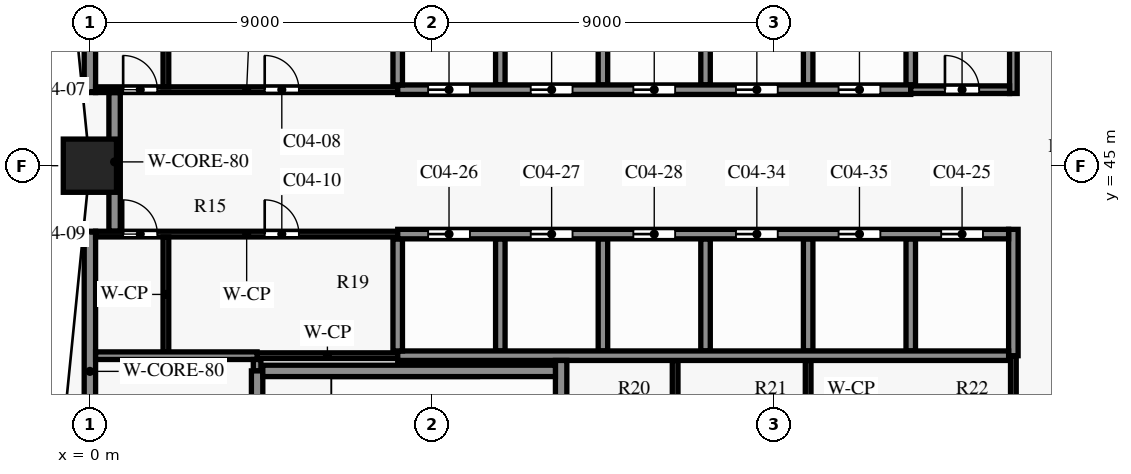
"""IFC4 building model, lengths in metres.
Left out: names, types, materials, properties, quantities, classifications, styles, units other than length and angle.
Written with IfcOpenShell. Run it as: python <this file> out.ifc"""

import sys

from ifc_helpers import new_model, si_unit, direction, frame, frame_2d, origin, origin_2d, place, context, subcontext, project, spatial, rectangle, extrude, element, fill, save


model = new_model("IFC4")
c1 = context("Model", 3, precision=1e-05, world=origin(), true_north=direction((0.0, 1.0)))
c2 = subcontext(c1, "Body", "Model", "MODEL_VIEW")
j1 = project(units=[si_unit("LENGTHUNIT", "METRE"), si_unit("PLANEANGLEUNIT", "RADIAN")], contexts=[c1])
p1 = place(None, origin())
s1 = spatial("IfcSite", under=j1, at=p1, CompositionType="ELEMENT")
p2 = place(p1, origin())
s2 = spatial("IfcBuilding", under=s1, at=p2, CompositionType="ELEMENT")
p3 = place(p2, frame((0.0, 0.0, 14.5)))
s3 = spatial("IfcBuildingStorey", under=s2, at=p3, CompositionType="ELEMENT", Elevation=14.5)
p4 = place(p3, frame((0.0, 45.0, 0.0), z_axis=(0.0, 0.0, 1.0), x_axis=(1.0, 0.0, 0.0)))
e1 = element("IfcColumn", 1, at=p4, inside=s3, PredefinedType="COLUMN", context=c2, shape_type="SweptSolid", body=[
    extrude(rectangle(XDim=1.4, YDim=1.4, at=origin_2d()), origin(), (0.0, 0.0, 1.0), 5.0),
])
p5 = place(p3, frame((4.55, 39.6, 0.0), z_axis=(0.0, 0.0, 1.0), x_axis=(1.0, 0.0, 0.0)))
e2 = element("IfcWall", 2, at=p5, inside=s3, PredefinedType="SHEAR", context=c2, shape_type="SweptSolid", body=[
    extrude(rectangle(XDim=7.7, YDim=0.3, at=frame_2d((3.85, 0.0))), origin(), (0.0, 0.0, 1.0), 4.7),
])
p6 = place(p3, frame((4.4, 40.0, 0.0), z_axis=(0.0, 0.0, 1.0), x_axis=(1.0, 0.0, 0.0)))
e3 = element("IfcWall", 3, at=p6, inside=s3, PredefinedType="PARTITIONING", context=c2, shape_type="SweptSolid", body=[
    extrude(rectangle(XDim=3.7, YDim=0.15, at=frame_2d((1.85, 0.0))), origin(), (0.0, 0.0, 1.0), 4.7),
])
p7 = place(p3, frame((0.15, 40.0, 0.0), z_axis=(0.0, 0.0, 1.0), x_axis=(1.0, 0.0, 0.0)))
e4 = element("IfcWall", 4, at=p7, inside=s3, PredefinedType="PARTITIONING", context=c2, shape_type="SweptSolid", body=[
    extrude(rectangle(XDim=4.25, YDim=0.2, at=frame_2d((2.125, 0.0))), origin(), (0.0, 0.0, 1.0), 4.7),
])
p8 = place(p3, frame((8.1, 40.0, 0.0), z_axis=(0.0, 0.0, 1.0), x_axis=(1.0, 0.0, 0.0)))
e5 = element("IfcWall", 5, at=p8, inside=s3, PredefinedType="SHEAR", context=c2, shape_type="SweptSolid", body=[
    extrude(rectangle(XDim=16.075, YDim=0.25, at=frame_2d((8.038, 0.0))), origin(), (0.0, 0.0, 1.0), 4.7),
])
p9 = place(p3, frame((0.15, 43.2, 0.0), z_axis=(0.0, 0.0, 1.0), x_axis=(1.0, 0.0, 0.0)))
e6 = element("IfcWall", 6, at=p9, inside=s3, PredefinedType="PARTITIONING", context=c2, shape_type="SweptSolid", body=[
    extrude(rectangle(XDim=7.95, YDim=0.15, at=frame_2d((3.975, 0.0))), origin(), (0.0, 0.0, 1.0), 4.7),
])
p10 = place(p9, frame((0.725, 0.0, 0.0)))
e7 = element("IfcOpeningElement", 7, at=p10, cuts=e6, PredefinedType="OPENING", context=c2, shape_type="SweptSolid", body=[
    extrude(rectangle(XDim=0.9, YDim=2.1, at=frame_2d((0.45, 1.05))), frame((0.0, 0.085, 0.0), z_axis=(0.0, -1.0, 0.0), x_axis=(1.0, 0.0, 0.0)), (0.0, 0.0, 1.0), 0.17),
])
p11 = place(p9, frame((4.45, 0.0, 0.0)))
e8 = element("IfcOpeningElement", 8, at=p11, cuts=e6, PredefinedType="OPENING", context=c2, shape_type="SweptSolid", body=[
    extrude(rectangle(XDim=0.9, YDim=2.1, at=frame_2d((0.45, 1.05))), frame((0.0, 0.085, 0.0), z_axis=(0.0, -1.0, 0.0), x_axis=(1.0, 0.0, 0.0)), (0.0, 0.0, 1.0), 0.17),
])
p12 = place(p3, frame((8.1, 43.2, 0.0), z_axis=(0.0, 0.0, 1.0), x_axis=(1.0, 0.0, 0.0)))
e9 = element("IfcWall", 9, at=p12, inside=s3, PredefinedType="SHEAR", context=c2, shape_type="SweptSolid", body=[
    extrude(rectangle(XDim=16.075, YDim=0.25, at=frame_2d((8.038, 0.0))), origin(), (0.0, 0.0, 1.0), 4.7),
])
p13 = place(p12, frame((14.3, 0.0, 0.0)))
e10 = element("IfcOpeningElement", 10, at=p13, cuts=e9, PredefinedType="OPENING", context=c2, shape_type="SweptSolid", body=[
    extrude(rectangle(XDim=1.1, YDim=2.1, at=frame_2d((0.55, 1.05))), frame((0.0, 0.135, 0.0), z_axis=(0.0, -1.0, 0.0), x_axis=(1.0, 0.0, 0.0)), (0.0, 0.0, 1.0), 0.27),
])
p14 = place(p12, frame((0.8, 0.0, 0.0)))
e11 = element("IfcOpeningElement", 11, at=p14, cuts=e9, PredefinedType="OPENING", context=c2, shape_type="SweptSolid", body=[
    extrude(rectangle(XDim=1.1, YDim=2.1, at=frame_2d((0.55, 1.05))), frame((0.0, 0.135, 0.0), z_axis=(0.0, -1.0, 0.0), x_axis=(1.0, 0.0, 0.0)), (0.0, 0.0, 1.0), 0.27),
])
p15 = place(p12, frame((3.5, 0.0, 0.0)))
e12 = element("IfcOpeningElement", 12, at=p15, cuts=e9, PredefinedType="OPENING", context=c2, shape_type="SweptSolid", body=[
    extrude(rectangle(XDim=1.1, YDim=2.1, at=frame_2d((0.55, 1.05))), frame((0.0, 0.135, 0.0), z_axis=(0.0, -1.0, 0.0), x_axis=(1.0, 0.0, 0.0)), (0.0, 0.0, 1.0), 0.27),
])
p16 = place(p12, frame((6.2, 0.0, 0.0)))
e13 = element("IfcOpeningElement", 13, at=p16, cuts=e9, PredefinedType="OPENING", context=c2, shape_type="SweptSolid", body=[
    extrude(rectangle(XDim=1.1, YDim=2.1, at=frame_2d((0.55, 1.05))), frame((0.0, 0.135, 0.0), z_axis=(0.0, -1.0, 0.0), x_axis=(1.0, 0.0, 0.0)), (0.0, 0.0, 1.0), 0.27),
])
p17 = place(p12, frame((8.9, 0.0, 0.0)))
e14 = element("IfcOpeningElement", 14, at=p17, cuts=e9, PredefinedType="OPENING", context=c2, shape_type="SweptSolid", body=[
    extrude(rectangle(XDim=1.1, YDim=2.1, at=frame_2d((0.55, 1.05))), frame((0.0, 0.135, 0.0), z_axis=(0.0, -1.0, 0.0), x_axis=(1.0, 0.0, 0.0)), (0.0, 0.0, 1.0), 0.27),
])
p18 = place(p12, frame((11.6, 0.0, 0.0)))
e15 = element("IfcOpeningElement", 15, at=p18, cuts=e9, PredefinedType="OPENING", context=c2, shape_type="SweptSolid", body=[
    extrude(rectangle(XDim=1.1, YDim=2.1, at=frame_2d((0.55, 1.05))), frame((0.0, 0.135, 0.0), z_axis=(0.0, -1.0, 0.0), x_axis=(1.0, 0.0, 0.0)), (0.0, 0.0, 1.0), 0.27),
])
p19 = place(p3, frame((0.15, 47.0, 0.0), z_axis=(0.0, 0.0, 1.0), x_axis=(1.0, 0.0, 0.0)))
e16 = element("IfcWall", 16, at=p19, inside=s3, PredefinedType="PARTITIONING", context=c2, shape_type="SweptSolid", body=[
    extrude(rectangle(XDim=7.95, YDim=0.15, at=frame_2d((3.975, 0.0))), origin(), (0.0, 0.0, 1.0), 4.7),
])
p20 = place(p19, frame((0.725, 0.0, 0.0)))
e17 = element("IfcOpeningElement", 17, at=p20, cuts=e16, PredefinedType="OPENING", context=c2, shape_type="SweptSolid", body=[
    extrude(rectangle(XDim=0.9, YDim=2.1, at=frame_2d((0.45, 1.05))), frame((0.0, 0.085, 0.0), z_axis=(0.0, -1.0, 0.0), x_axis=(1.0, 0.0, 0.0)), (0.0, 0.0, 1.0), 0.17),
])
p21 = place(p19, frame((4.45, 0.0, 0.0)))
e18 = element("IfcOpeningElement", 18, at=p21, cuts=e16, PredefinedType="OPENING", context=c2, shape_type="SweptSolid", body=[
    extrude(rectangle(XDim=0.9, YDim=2.1, at=frame_2d((0.45, 1.05))), frame((0.0, 0.085, 0.0), z_axis=(0.0, -1.0, 0.0), x_axis=(1.0, 0.0, 0.0)), (0.0, 0.0, 1.0), 0.17),
])
p22 = place(p3, frame((21.6, 47.0, 0.0), z_axis=(0.0, 0.0, 1.0), x_axis=(1.0, 0.0, 0.0)))
e19 = element("IfcWall", 19, at=p22, inside=s3, PredefinedType="PARTITIONING", context=c2, shape_type="SweptSolid", body=[
    extrude(rectangle(XDim=2.6, YDim=0.2, at=frame_2d((1.3, 0.0))), origin(), (0.0, 0.0, 1.0), 4.7),
])
p23 = place(p22, frame((0.9, 0.0, 0.0)))
e20 = element("IfcOpeningElement", 20, at=p23, cuts=e19, PredefinedType="OPENING", context=c2, shape_type="SweptSolid", body=[
    extrude(rectangle(XDim=0.9, YDim=2.1, at=frame_2d((0.45, 1.05))), frame((0.0, 0.11, 0.0), z_axis=(0.0, -1.0, 0.0), x_axis=(1.0, 0.0, 0.0)), (0.0, 0.0, 1.0), 0.22),
])
p24 = place(p3, frame((8.1, 47.0, 0.0), z_axis=(0.0, 0.0, 1.0), x_axis=(1.0, 0.0, 0.0)))
e21 = element("IfcWall", 21, at=p24, inside=s3, PredefinedType="SHEAR", context=c2, shape_type="SweptSolid", body=[
    extrude(rectangle(XDim=13.5, YDim=0.25, at=frame_2d((6.75, 0.0))), origin(), (0.0, 0.0, 1.0), 4.7),
])
p25 = place(p24, frame((0.8, 0.0, 0.0)))
e22 = element("IfcOpeningElement", 22, at=p25, cuts=e21, PredefinedType="OPENING", context=c2, shape_type="SweptSolid", body=[
    extrude(rectangle(XDim=1.1, YDim=2.1, at=frame_2d((0.55, 1.05))), frame((0.0, 0.135, 0.0), z_axis=(0.0, -1.0, 0.0), x_axis=(1.0, 0.0, 0.0)), (0.0, 0.0, 1.0), 0.27),
])
p26 = place(p24, frame((3.5, 0.0, 0.0)))
e23 = element("IfcOpeningElement", 23, at=p26, cuts=e21, PredefinedType="OPENING", context=c2, shape_type="SweptSolid", body=[
    extrude(rectangle(XDim=1.1, YDim=2.1, at=frame_2d((0.55, 1.05))), frame((0.0, 0.135, 0.0), z_axis=(0.0, -1.0, 0.0), x_axis=(1.0, 0.0, 0.0)), (0.0, 0.0, 1.0), 0.27),
])
p27 = place(p24, frame((6.2, 0.0, 0.0)))
e24 = element("IfcOpeningElement", 24, at=p27, cuts=e21, PredefinedType="OPENING", context=c2, shape_type="SweptSolid", body=[
    extrude(rectangle(XDim=1.1, YDim=2.1, at=frame_2d((0.55, 1.05))), frame((0.0, 0.135, 0.0), z_axis=(0.0, -1.0, 0.0), x_axis=(1.0, 0.0, 0.0)), (0.0, 0.0, 1.0), 0.27),
])
p28 = place(p24, frame((8.9, 0.0, 0.0)))
e25 = element("IfcOpeningElement", 25, at=p28, cuts=e21, PredefinedType="OPENING", context=c2, shape_type="SweptSolid", body=[
    extrude(rectangle(XDim=1.1, YDim=2.1, at=frame_2d((0.55, 1.05))), frame((0.0, 0.135, 0.0), z_axis=(0.0, -1.0, 0.0), x_axis=(1.0, 0.0, 0.0)), (0.0, 0.0, 1.0), 0.27),
])
p29 = place(p24, frame((11.6, 0.0, 0.0)))
e26 = element("IfcOpeningElement", 26, at=p29, cuts=e21, PredefinedType="OPENING", context=c2, shape_type="SweptSolid", body=[
    extrude(rectangle(XDim=1.1, YDim=2.1, at=frame_2d((0.55, 1.05))), frame((0.0, 0.135, 0.0), z_axis=(0.0, -1.0, 0.0), x_axis=(1.0, 0.0, 0.0)), (0.0, 0.0, 1.0), 0.27),
])
p30 = place(p3, frame((0.0, 35.9, 0.0), z_axis=(0.0, 0.0, 1.0), x_axis=(0.0, 1.0, 0.0)))
e27 = element("IfcWall", 27, at=p30, inside=s3, PredefinedType="SHEAR", context=c2, shape_type="SweptSolid", body=[
    extrude(rectangle(XDim=7.375, YDim=0.3, at=frame_2d((3.688, 0.0))), origin(), (0.0, 0.0, 1.0), 4.7),
])
p31 = place(p3, frame((0.0, 46.925, 0.0), z_axis=(0.0, 0.0, 1.0), x_axis=(0.0, 1.0, 0.0)))
e28 = element("IfcWall", 28, at=p31, inside=s3, PredefinedType="SHEAR", context=c2, shape_type="SweptSolid", body=[
    extrude(rectangle(XDim=3.425, YDim=0.3, at=frame_2d((1.712, 0.0))), origin(), (0.0, 0.0, 1.0), 4.7),
])
p32 = place(p3, frame((0.65, 43.275, 0.0), z_axis=(0.0, 0.0, 1.0), x_axis=(0.0, 1.0, 0.0)))
e29 = element("IfcWall", 29, at=p32, inside=s3, PredefinedType="SHEAR", context=c2, shape_type="SweptSolid", body=[
    extrude(rectangle(XDim=3.65, YDim=0.3, at=frame_2d((1.825, 0.0))), origin(), (0.0, 0.0, 1.0), 4.7),
])
p33 = place(p3, frame((2.0, 40.1, 0.0), z_axis=(0.0, 0.0, 1.0), x_axis=(0.0, 1.0, 0.0)))
e30 = element("IfcWall", 30, at=p33, inside=s3, PredefinedType="PARTITIONING", context=c2, shape_type="SweptSolid", body=[
    extrude(rectangle(XDim=3.025, YDim=0.15, at=frame_2d((1.512, 0.0))), origin(), (0.0, 0.0, 1.0), 4.7),
])
p34 = place(p3, frame((2.0, 47.075, 0.0), z_axis=(0.0, 0.0, 1.0), x_axis=(0.0, 1.0, 0.0)))
e31 = element("IfcWall", 31, at=p34, inside=s3, PredefinedType="PARTITIONING", context=c2, shape_type="SweptSolid", body=[
    extrude(rectangle(XDim=3.05, YDim=0.15, at=frame_2d((1.525, 0.0))), origin(), (0.0, 0.0, 1.0), 4.7),
])
p35 = place(p3, frame((4.4, 39.6, 0.0), z_axis=(0.0, 0.0, 1.0), x_axis=(0.0, 1.0, 0.0)))
e32 = element("IfcWall", 32, at=p35, inside=s3, PredefinedType="PARTITIONING", context=c2, shape_type="SweptSolid", body=[
    extrude(rectangle(XDim=0.3, YDim=0.2, at=frame_2d((0.15, 0.0))), origin(), (0.0, 0.0, 1.0), 4.7),
])
p36 = place(p3, frame((4.4, 36.15, 0.0), z_axis=(0.0, 0.0, 1.0), x_axis=(0.0, 1.0, 0.0)))
e33 = element("IfcWall", 33, at=p36, inside=s3, PredefinedType="SHEAR", context=c2, shape_type="SweptSolid", body=[
    extrude(rectangle(XDim=3.45, YDim=0.3, at=frame_2d((1.725, 0.0))), origin(), (0.0, 0.0, 1.0), 4.7),
])
for number, where, z_axis, x_axis in (
    (34, (8.1, 40.125, 0.0), (0.0, 0.0, 1.0), (0.0, 1.0, 0.0)),
    (35, (8.1, 47.125, 0.0), (0.0, 0.0, 1.0), (0.0, 1.0, 0.0)),
    (36, (10.8, 40.125, 0.0), (0.0, 0.0, 1.0), (0.0, 1.0, 0.0)),
    (37, (10.8, 47.125, 0.0), (0.0, 0.0, 1.0), (0.0, 1.0, 0.0)),
):
    element("IfcWall", number, at=place(p3, frame(where, z_axis=z_axis, x_axis=x_axis)), inside=s3, PredefinedType="SHEAR", context=c2, shape_type="SweptSolid", body=[
        extrude(rectangle(XDim=2.95, YDim=0.25, at=frame_2d((1.475, 0.0))), origin(), (0.0, 0.0, 1.0), 4.7),
    ])
p37 = place(p3, frame((12.4, 36.15, 0.0), z_axis=(0.0, 0.0, 1.0), x_axis=(0.0, 1.0, 0.0)))
e38 = element("IfcWall", 38, at=p37, inside=s3, PredefinedType="SHEAR", context=c2, shape_type="SweptSolid", body=[
    extrude(rectangle(XDim=3.725, YDim=0.3, at=frame_2d((1.863, 0.0))), origin(), (0.0, 0.0, 1.0), 4.7),
])
for number, where, z_axis, x_axis in (
    (39, (13.5, 40.125, 0.0), (0.0, 0.0, 1.0), (0.0, 1.0, 0.0)),
    (40, (13.5, 47.125, 0.0), (0.0, 0.0, 1.0), (0.0, 1.0, 0.0)),
):
    element("IfcWall", number, at=place(p3, frame(where, z_axis=z_axis, x_axis=x_axis)), inside=s3, PredefinedType="SHEAR", context=c2, shape_type="SweptSolid", body=[
        extrude(rectangle(XDim=2.95, YDim=0.25, at=frame_2d((1.475, 0.0))), origin(), (0.0, 0.0, 1.0), 4.7),
    ])
p38 = place(p3, frame((15.4, 36.075, 0.0), z_axis=(0.0, 0.0, 1.0), x_axis=(0.0, 1.0, 0.0)))
e41 = element("IfcWall", 41, at=p38, inside=s3, PredefinedType="PARTITIONING", context=c2, shape_type="SweptSolid", body=[
    extrude(rectangle(XDim=3.8, YDim=0.15, at=frame_2d((1.9, 0.0))), origin(), (0.0, 0.0, 1.0), 4.7),
])
for number, where, z_axis, x_axis in (
    (42, (16.2, 40.125, 0.0), (0.0, 0.0, 1.0), (0.0, 1.0, 0.0)),
    (43, (16.2, 47.125, 0.0), (0.0, 0.0, 1.0), (0.0, 1.0, 0.0)),
):
    element("IfcWall", number, at=place(p3, frame(where, z_axis=z_axis, x_axis=x_axis)), inside=s3, PredefinedType="SHEAR", context=c2, shape_type="SweptSolid", body=[
        extrude(rectangle(XDim=2.95, YDim=0.25, at=frame_2d((1.475, 0.0))), origin(), (0.0, 0.0, 1.0), 4.7),
    ])
p39 = place(p3, frame((18.9, 36.075, 0.0), z_axis=(0.0, 0.0, 1.0), x_axis=(0.0, 1.0, 0.0)))
e44 = element("IfcWall", 44, at=p39, inside=s3, PredefinedType="PARTITIONING", context=c2, shape_type="SweptSolid", body=[
    extrude(rectangle(XDim=3.8, YDim=0.15, at=frame_2d((1.9, 0.0))), origin(), (0.0, 0.0, 1.0), 4.7),
])
for number, where, z_axis, x_axis in (
    (45, (18.9, 40.125, 0.0), (0.0, 0.0, 1.0), (0.0, 1.0, 0.0)),
    (46, (18.9, 47.125, 0.0), (0.0, 0.0, 1.0), (0.0, 1.0, 0.0)),
    (47, (21.6, 40.125, 0.0), (0.0, 0.0, 1.0), (0.0, 1.0, 0.0)),
):
    element("IfcWall", number, at=place(p3, frame(where, z_axis=z_axis, x_axis=x_axis)), inside=s3, PredefinedType="SHEAR", context=c2, shape_type="SweptSolid", body=[
        extrude(rectangle(XDim=2.95, YDim=0.25, at=frame_2d((1.475, 0.0))), origin(), (0.0, 0.0, 1.0), 4.7),
    ])
p40 = place(p3, frame((21.6, 47.125, 0.0), z_axis=(0.0, 0.0, 1.0), x_axis=(0.0, 1.0, 0.0)))
e48 = element("IfcWall", 48, at=p40, inside=s3, PredefinedType="SHEAR", context=c2, shape_type="SweptSolid", body=[
    extrude(rectangle(XDim=3.075, YDim=0.25, at=frame_2d((1.538, 0.0))), origin(), (0.0, 0.0, 1.0), 4.7),
])
p41 = place(p3, frame((24.3, 35.925, 0.0), z_axis=(0.0, 0.0, 1.0), x_axis=(0.0, 1.0, 0.0)))
e49 = element("IfcWall", 49, at=p41, inside=s3, PredefinedType="SHEAR", context=c2, shape_type="SweptSolid", body=[
    extrude(rectangle(XDim=4.075, YDim=0.15, at=frame_2d((2.038, 0.0))), origin(), (0.0, 0.0, 1.0), 4.7),
])
p42 = place(p3, frame((24.3, 46.9, 0.0), z_axis=(0.0, 0.0, 1.0), x_axis=(0.0, 1.0, 0.0)))
e50 = element("IfcWall", 50, at=p42, inside=s3, PredefinedType="SHEAR", context=c2, shape_type="SweptSolid", body=[
    extrude(rectangle(XDim=5.0, YDim=0.2, at=frame_2d((2.5, 0.0))), origin(), (0.0, 0.0, 1.0), 4.7),
])
p43 = place(p3, frame((24.3, 40.0, 0.0), z_axis=(0.0, 0.0, 1.0), x_axis=(0.0, 1.0, 0.0)))
e51 = element("IfcWall", 51, at=p43, inside=s3, PredefinedType="SHEAR", context=c2, shape_type="SweptSolid", body=[
    extrude(rectangle(XDim=3.325, YDim=0.25, at=frame_2d((1.663, 0.0))), origin(), (0.0, 0.0, 1.0), 4.7),
])
p44 = place(p23, origin())
e52 = element("IfcDoor", 52, at=p44, inside=s3, OperationType="SINGLE_SWING_LEFT", PredefinedType="DOOR", context=c2, shape_type="SweptSolid", body=[
    extrude(rectangle(XDim=0.9, YDim=2.1, at=frame_2d((0.45, 1.05))), frame((0.0, 0.025, 0.0), z_axis=(0.0, -1.0, 0.0), x_axis=(1.0, 0.0, 0.0)), (0.0, 0.0, 1.0), 0.05),
])
fill(e20, e52)
p45 = place(p20, origin())
e53 = element("IfcDoor", 53, at=p45, inside=s3, OperationType="SINGLE_SWING_RIGHT", PredefinedType="DOOR", context=c2, shape_type="SweptSolid", body=[
    extrude(rectangle(XDim=0.9, YDim=2.1, at=frame_2d((0.45, 1.05))), frame((0.0, 0.025, 0.0), z_axis=(0.0, -1.0, 0.0), x_axis=(1.0, 0.0, 0.0)), (0.0, 0.0, 1.0), 0.05),
])
fill(e17, e53)
p46 = place(p21, origin())
e54 = element("IfcDoor", 54, at=p46, inside=s3, OperationType="SINGLE_SWING_LEFT", PredefinedType="DOOR", context=c2, shape_type="SweptSolid", body=[
    extrude(rectangle(XDim=0.9, YDim=2.1, at=frame_2d((0.45, 1.05))), frame((0.0, 0.025, 0.0), z_axis=(0.0, -1.0, 0.0), x_axis=(1.0, 0.0, 0.0)), (0.0, 0.0, 1.0), 0.05),
])
fill(e18, e54)
p47 = place(p10, origin())
e55 = element("IfcDoor", 55, at=p47, inside=s3, OperationType="SINGLE_SWING_LEFT", PredefinedType="DOOR", context=c2, shape_type="SweptSolid", body=[
    extrude(rectangle(XDim=0.9, YDim=2.1, at=frame_2d((0.45, 1.05))), frame((0.0, 0.025, 0.0), z_axis=(0.0, -1.0, 0.0), x_axis=(1.0, 0.0, 0.0)), (0.0, 0.0, 1.0), 0.05),
])
fill(e7, e55)
p48 = place(p11, origin())
e56 = element("IfcDoor", 56, at=p48, inside=s3, OperationType="SINGLE_SWING_RIGHT", PredefinedType="DOOR", context=c2, shape_type="SweptSolid", body=[
    extrude(rectangle(XDim=0.9, YDim=2.1, at=frame_2d((0.45, 1.05))), frame((0.0, 0.025, 0.0), z_axis=(0.0, -1.0, 0.0), x_axis=(1.0, 0.0, 0.0)), (0.0, 0.0, 1.0), 0.05),
])
fill(e8, e56)
p49 = place(p13, origin())
e57 = element("IfcDoor", 57, at=p49, inside=s3, OperationType="DOUBLE_DOOR_SLIDING", PredefinedType="DOOR", context=c2, shape_type="SweptSolid", body=[
    extrude(rectangle(XDim=1.1, YDim=2.1, at=frame_2d((0.55, 1.05))), frame((0.0, 0.025, 0.0), z_axis=(0.0, -1.0, 0.0), x_axis=(1.0, 0.0, 0.0)), (0.0, 0.0, 1.0), 0.05),
])
fill(e10, e57)
p50 = place(p14, origin())
e58 = element("IfcDoor", 58, at=p50, inside=s3, OperationType="DOUBLE_DOOR_SLIDING", PredefinedType="DOOR", context=c2, shape_type="SweptSolid", body=[
    extrude(rectangle(XDim=1.1, YDim=2.1, at=frame_2d((0.55, 1.05))), frame((0.0, 0.025, 0.0), z_axis=(0.0, -1.0, 0.0), x_axis=(1.0, 0.0, 0.0)), (0.0, 0.0, 1.0), 0.05),
])
fill(e11, e58)
p51 = place(p15, origin())
e59 = element("IfcDoor", 59, at=p51, inside=s3, OperationType="DOUBLE_DOOR_SLIDING", PredefinedType="DOOR", context=c2, shape_type="SweptSolid", body=[
    extrude(rectangle(XDim=1.1, YDim=2.1, at=frame_2d((0.55, 1.05))), frame((0.0, 0.025, 0.0), z_axis=(0.0, -1.0, 0.0), x_axis=(1.0, 0.0, 0.0)), (0.0, 0.0, 1.0), 0.05),
])
fill(e12, e59)
p52 = place(p16, origin())
e60 = element("IfcDoor", 60, at=p52, inside=s3, OperationType="DOUBLE_DOOR_SLIDING", PredefinedType="DOOR", context=c2, shape_type="SweptSolid", body=[
    extrude(rectangle(XDim=1.1, YDim=2.1, at=frame_2d((0.55, 1.05))), frame((0.0, 0.025, 0.0), z_axis=(0.0, -1.0, 0.0), x_axis=(1.0, 0.0, 0.0)), (0.0, 0.0, 1.0), 0.05),
])
fill(e13, e60)
p53 = place(p25, origin())
e61 = element("IfcDoor", 61, at=p53, inside=s3, OperationType="DOUBLE_DOOR_SLIDING", PredefinedType="DOOR", context=c2, shape_type="SweptSolid", body=[
    extrude(rectangle(XDim=1.1, YDim=2.1, at=frame_2d((0.55, 1.05))), frame((0.0, 0.025, 0.0), z_axis=(0.0, -1.0, 0.0), x_axis=(1.0, 0.0, 0.0)), (0.0, 0.0, 1.0), 0.05),
])
fill(e22, e61)
p54 = place(p26, origin())
e62 = element("IfcDoor", 62, at=p54, inside=s3, OperationType="DOUBLE_DOOR_SLIDING", PredefinedType="DOOR", context=c2, shape_type="SweptSolid", body=[
    extrude(rectangle(XDim=1.1, YDim=2.1, at=frame_2d((0.55, 1.05))), frame((0.0, 0.025, 0.0), z_axis=(0.0, -1.0, 0.0), x_axis=(1.0, 0.0, 0.0)), (0.0, 0.0, 1.0), 0.05),
])
fill(e23, e62)
p55 = place(p27, origin())
e63 = element("IfcDoor", 63, at=p55, inside=s3, OperationType="DOUBLE_DOOR_SLIDING", PredefinedType="DOOR", context=c2, shape_type="SweptSolid", body=[
    extrude(rectangle(XDim=1.1, YDim=2.1, at=frame_2d((0.55, 1.05))), frame((0.0, 0.025, 0.0), z_axis=(0.0, -1.0, 0.0), x_axis=(1.0, 0.0, 0.0)), (0.0, 0.0, 1.0), 0.05),
])
fill(e24, e63)
p56 = place(p28, origin())
e64 = element("IfcDoor", 64, at=p56, inside=s3, OperationType="DOUBLE_DOOR_SLIDING", PredefinedType="DOOR", context=c2, shape_type="SweptSolid", body=[
    extrude(rectangle(XDim=1.1, YDim=2.1, at=frame_2d((0.55, 1.05))), frame((0.0, 0.025, 0.0), z_axis=(0.0, -1.0, 0.0), x_axis=(1.0, 0.0, 0.0)), (0.0, 0.0, 1.0), 0.05),
])
fill(e25, e64)
p57 = place(p29, origin())
e65 = element("IfcDoor", 65, at=p57, inside=s3, OperationType="DOUBLE_DOOR_SLIDING", PredefinedType="DOOR", context=c2, shape_type="SweptSolid", body=[
    extrude(rectangle(XDim=1.1, YDim=2.1, at=frame_2d((0.55, 1.05))), frame((0.0, 0.025, 0.0), z_axis=(0.0, -1.0, 0.0), x_axis=(1.0, 0.0, 0.0)), (0.0, 0.0, 1.0), 0.05),
])
fill(e26, e65)
p58 = place(p17, origin())
e66 = element("IfcDoor", 66, at=p58, inside=s3, OperationType="DOUBLE_DOOR_SLIDING", PredefinedType="DOOR", context=c2, shape_type="SweptSolid", body=[
    extrude(rectangle(XDim=1.1, YDim=2.1, at=frame_2d((0.55, 1.05))), frame((0.0, 0.025, 0.0), z_axis=(0.0, -1.0, 0.0), x_axis=(1.0, 0.0, 0.0)), (0.0, 0.0, 1.0), 0.05),
])
fill(e14, e66)
p59 = place(p18, origin())
e67 = element("IfcDoor", 67, at=p59, inside=s3, OperationType="DOUBLE_DOOR_SLIDING", PredefinedType="DOOR", context=c2, shape_type="SweptSolid", body=[
    extrude(rectangle(XDim=1.1, YDim=2.1, at=frame_2d((0.55, 1.05))), frame((0.0, 0.025, 0.0), z_axis=(0.0, -1.0, 0.0), x_axis=(1.0, 0.0, 0.0)), (0.0, 0.0, 1.0), 0.05),
])
fill(e15, e67)
save(model, sys.argv[1])
